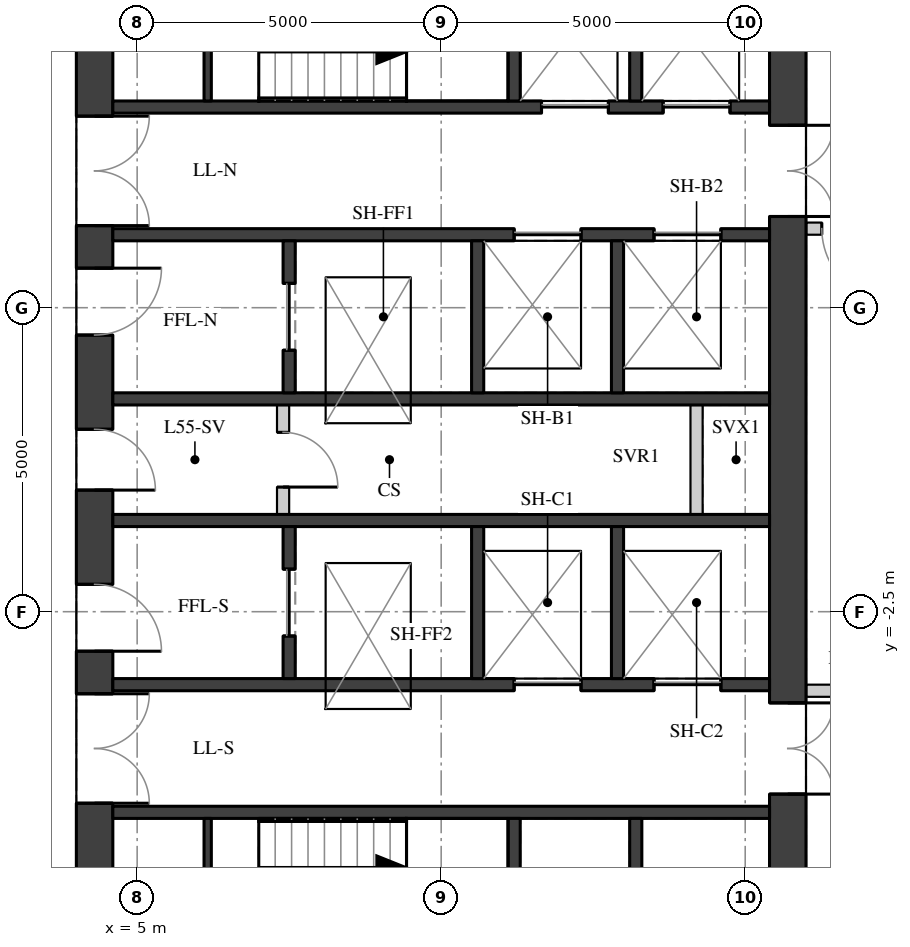
"""IFC4 building model, lengths in metres.
Left out: names, types, materials, properties, quantities, classifications, styles, units other than length and angle.
Written with IfcOpenShell. Run it as: python <this file> out.ifc"""

import sys

from ifc_helpers import new_model, si_unit, direction, frame, frame_2d, origin, place, context, subcontext, project, spatial, rectangle, extrude, element, fill, save


model = new_model("IFC4")
c1 = context("Model", 3, precision=1e-05, world=origin(), true_north=direction((0.0, 1.0)))
c2 = subcontext(c1, "Body", "Model", "MODEL_VIEW")
j1 = project(units=[si_unit("LENGTHUNIT", "METRE"), si_unit("PLANEANGLEUNIT", "RADIAN")], contexts=[c1])
p1 = place(None, origin())
s1 = spatial("IfcSite", under=j1, at=p1, CompositionType="ELEMENT")
p2 = place(p1, origin())
s2 = spatial("IfcBuilding", under=s1, at=p2, CompositionType="ELEMENT")
p3 = place(p2, frame((0.0, 0.0, 195.8)))
s3 = spatial("IfcBuildingStorey", under=s2, at=p3, CompositionType="ELEMENT", Elevation=195.8)
p4 = place(p3, frame((4.3, -9.4, 0.0), z_axis=(0.0, 0.0, 1.0), x_axis=(0.0, 1.0, 0.0)))
e1 = element("IfcWall", 1, at=p4, inside=s3, PredefinedType="SHEAR", context=c2, shape_type="SweptSolid", body=[
    extrude(rectangle(XDim=18.8, YDim=0.6, at=frame_2d((9.4, 0.0))), origin(), (0.0, 0.0, 1.0), 3.02),
])
p5 = place(p4, frame((0.65, 0.0, 0.0)))
e2 = element("IfcOpeningElement", 2, at=p5, cuts=e1, PredefinedType="OPENING", context=c2, shape_type="SweptSolid", body=[
    extrude(rectangle(XDim=1.5, YDim=2.1, at=frame_2d((0.75, 1.05))), frame((0.0, 0.31, 0.0), z_axis=(0.0, -1.0, 0.0), x_axis=(1.0, 0.0, 0.0)), (0.0, 0.0, 1.0), 0.62),
])
p6 = place(p4, frame((3.75, 0.0, 0.0)))
e3 = element("IfcOpeningElement", 3, at=p6, cuts=e1, PredefinedType="OPENING", context=c2, shape_type="SweptSolid", body=[
    extrude(rectangle(XDim=1.8, YDim=2.1, at=frame_2d((0.9, 1.05))), frame((0.0, 0.31, 0.0), z_axis=(0.0, -1.0, 0.0), x_axis=(1.0, 0.0, 0.0)), (0.0, 0.0, 1.0), 0.62),
])
p7 = place(p4, frame((6.25, 0.0, 0.0)))
e4 = element("IfcOpeningElement", 4, at=p7, cuts=e1, PredefinedType="OPENING", context=c2, shape_type="SweptSolid", body=[
    extrude(rectangle(XDim=1.1, YDim=2.1, at=frame_2d((0.55, 1.05))), frame((0.0, 0.31, 0.0), z_axis=(0.0, -1.0, 0.0), x_axis=(1.0, 0.0, 0.0)), (0.0, 0.0, 1.0), 0.62),
])
p8 = place(p4, frame((8.9, 0.0, 0.0)))
e5 = element("IfcOpeningElement", 5, at=p8, cuts=e1, PredefinedType="OPENING", context=c2, shape_type="SweptSolid", body=[
    extrude(rectangle(XDim=1.0, YDim=2.1, at=frame_2d((0.5, 1.05))), frame((0.0, 0.31, 0.0), z_axis=(0.0, -1.0, 0.0), x_axis=(1.0, 0.0, 0.0)), (0.0, 0.0, 1.0), 0.62),
])
p9 = place(p4, frame((11.45, 0.0, 0.0)))
e6 = element("IfcOpeningElement", 6, at=p9, cuts=e1, PredefinedType="OPENING", context=c2, shape_type="SweptSolid", body=[
    extrude(rectangle(XDim=1.1, YDim=2.1, at=frame_2d((0.55, 1.05))), frame((0.0, 0.31, 0.0), z_axis=(0.0, -1.0, 0.0), x_axis=(1.0, 0.0, 0.0)), (0.0, 0.0, 1.0), 0.62),
])
p10 = place(p4, frame((13.25, 0.0, 0.0)))
e7 = element("IfcOpeningElement", 7, at=p10, cuts=e1, PredefinedType="OPENING", context=c2, shape_type="SweptSolid", body=[
    extrude(rectangle(XDim=1.8, YDim=2.1, at=frame_2d((0.9, 1.05))), frame((0.0, 0.31, 0.0), z_axis=(0.0, -1.0, 0.0), x_axis=(1.0, 0.0, 0.0)), (0.0, 0.0, 1.0), 0.62),
])
p11 = place(p4, frame((16.65, 0.0, 0.0)))
e8 = element("IfcOpeningElement", 8, at=p11, cuts=e1, PredefinedType="OPENING", context=c2, shape_type="SweptSolid", body=[
    extrude(rectangle(XDim=1.5, YDim=2.1, at=frame_2d((0.75, 1.05))), frame((0.0, 0.31, 0.0), z_axis=(0.0, -1.0, 0.0), x_axis=(1.0, 0.0, 0.0)), (0.0, 0.0, 1.0), 0.62),
])
p12 = place(p3, frame((15.7, -9.4, 0.0), z_axis=(0.0, 0.0, 1.0), x_axis=(0.0, 1.0, 0.0)))
e9 = element("IfcWall", 9, at=p12, inside=s3, PredefinedType="SHEAR", context=c2, shape_type="SweptSolid", body=[
    extrude(rectangle(XDim=18.8, YDim=0.6, at=frame_2d((9.4, 0.0))), origin(), (0.0, 0.0, 1.0), 3.02),
])
p13 = place(p12, frame((13.4, 0.0, 0.0)))
e10 = element("IfcOpeningElement", 10, at=p13, cuts=e9, PredefinedType="OPENING", context=c2, shape_type="SweptSolid", body=[
    extrude(rectangle(XDim=1.5, YDim=2.1, at=frame_2d((0.75, 1.05))), frame((0.0, 0.31, 0.0), z_axis=(0.0, -1.0, 0.0), x_axis=(1.0, 0.0, 0.0)), (0.0, 0.0, 1.0), 0.62),
])
p14 = place(p12, frame((3.9, 0.0, 0.0)))
e11 = element("IfcOpeningElement", 11, at=p14, cuts=e9, PredefinedType="OPENING", context=c2, shape_type="SweptSolid", body=[
    extrude(rectangle(XDim=1.5, YDim=2.1, at=frame_2d((0.75, 1.05))), frame((0.0, 0.31, 0.0), z_axis=(0.0, -1.0, 0.0), x_axis=(1.0, 0.0, 0.0)), (0.0, 0.0, 1.0), 0.62),
])
p15 = place(p3, frame((4.6, 5.8, 0.0), z_axis=(0.0, 0.0, 1.0), x_axis=(1.0, 0.0, 0.0)))
e12 = element("IfcWall", 12, at=p15, inside=s3, PredefinedType="SHEAR", context=c2, shape_type="SweptSolid", body=[
    extrude(rectangle(XDim=10.8, YDim=0.2, at=frame_2d((5.4, 0.0))), origin(), (0.0, 0.0, 1.0), 3.02),
])
p16 = place(p15, frame((7.05, 0.0, 0.0)))
e13 = element("IfcOpeningElement", 13, at=p16, cuts=e12, PredefinedType="OPENING", context=c2, shape_type="SweptSolid", body=[
    extrude(rectangle(XDim=1.1, YDim=2.1, at=frame_2d((0.55, 1.05))), frame((0.0, 0.11, 0.0), z_axis=(0.0, -1.0, 0.0), x_axis=(1.0, 0.0, 0.0)), (0.0, 0.0, 1.0), 0.22),
])
p17 = place(p15, frame((9.05, 0.0, 0.0)))
e14 = element("IfcOpeningElement", 14, at=p17, cuts=e12, PredefinedType="OPENING", context=c2, shape_type="SweptSolid", body=[
    extrude(rectangle(XDim=1.1, YDim=2.1, at=frame_2d((0.55, 1.05))), frame((0.0, 0.11, 0.0), z_axis=(0.0, -1.0, 0.0), x_axis=(1.0, 0.0, 0.0)), (0.0, 0.0, 1.0), 0.22),
])
p18 = place(p3, frame((4.6, 3.7, 0.0), z_axis=(0.0, 0.0, 1.0), x_axis=(1.0, 0.0, 0.0)))
e15 = element("IfcWall", 15, at=p18, inside=s3, PredefinedType="SHEAR", context=c2, shape_type="SweptSolid", body=[
    extrude(rectangle(XDim=10.8, YDim=0.2, at=frame_2d((5.4, 0.0))), origin(), (0.0, 0.0, 1.0), 3.02),
])
p19 = place(p18, frame((6.6, 0.0, 0.0)))
e16 = element("IfcOpeningElement", 16, at=p19, cuts=e15, PredefinedType="OPENING", context=c2, shape_type="SweptSolid", body=[
    extrude(rectangle(XDim=1.1, YDim=2.1, at=frame_2d((0.55, 1.05))), frame((0.0, 0.11, 0.0), z_axis=(0.0, -1.0, 0.0), x_axis=(1.0, 0.0, 0.0)), (0.0, 0.0, 1.0), 0.22),
])
p20 = place(p18, frame((8.9, 0.0, 0.0)))
e17 = element("IfcOpeningElement", 17, at=p20, cuts=e15, PredefinedType="OPENING", context=c2, shape_type="SweptSolid", body=[
    extrude(rectangle(XDim=1.1, YDim=2.1, at=frame_2d((0.55, 1.05))), frame((0.0, 0.11, 0.0), z_axis=(0.0, -1.0, 0.0), x_axis=(1.0, 0.0, 0.0)), (0.0, 0.0, 1.0), 0.22),
])
for number, where, z_axis, x_axis in (
    (18, (4.6, 1.0, 0.0), (0.0, 0.0, 1.0), (1.0, 0.0, 0.0)),
    (19, (4.6, -1.0, 0.0), (0.0, 0.0, 1.0), (1.0, 0.0, 0.0)),
):
    element("IfcWall", number, at=place(p3, frame(where, z_axis=z_axis, x_axis=x_axis)), inside=s3, PredefinedType="SHEAR", context=c2, shape_type="SweptSolid", body=[
        extrude(rectangle(XDim=10.8, YDim=0.2, at=frame_2d((5.4, 0.0))), origin(), (0.0, 0.0, 1.0), 3.02),
    ])
p21 = place(p3, frame((4.6, -3.7, 0.0), z_axis=(0.0, 0.0, 1.0), x_axis=(1.0, 0.0, 0.0)))
e20 = element("IfcWall", 20, at=p21, inside=s3, PredefinedType="SHEAR", context=c2, shape_type="SweptSolid", body=[
    extrude(rectangle(XDim=10.8, YDim=0.2, at=frame_2d((5.4, 0.0))), origin(), (0.0, 0.0, 1.0), 3.02),
])
p22 = place(p21, frame((6.6, 0.0, 0.0)))
e21 = element("IfcOpeningElement", 21, at=p22, cuts=e20, PredefinedType="OPENING", context=c2, shape_type="SweptSolid", body=[
    extrude(rectangle(XDim=1.1, YDim=2.1, at=frame_2d((0.55, 1.05))), frame((0.0, 0.11, 0.0), z_axis=(0.0, -1.0, 0.0), x_axis=(1.0, 0.0, 0.0)), (0.0, 0.0, 1.0), 0.22),
])
p23 = place(p21, frame((8.9, 0.0, 0.0)))
e22 = element("IfcOpeningElement", 22, at=p23, cuts=e20, PredefinedType="OPENING", context=c2, shape_type="SweptSolid", body=[
    extrude(rectangle(XDim=1.1, YDim=2.1, at=frame_2d((0.55, 1.05))), frame((0.0, 0.11, 0.0), z_axis=(0.0, -1.0, 0.0), x_axis=(1.0, 0.0, 0.0)), (0.0, 0.0, 1.0), 0.22),
])
p24 = place(p3, frame((4.6, -5.8, 0.0), z_axis=(0.0, 0.0, 1.0), x_axis=(1.0, 0.0, 0.0)))
e23 = element("IfcWall", 23, at=p24, inside=s3, PredefinedType="SHEAR", context=c2, shape_type="SweptSolid", body=[
    extrude(rectangle(XDim=10.8, YDim=0.2, at=frame_2d((5.4, 0.0))), origin(), (0.0, 0.0, 1.0), 3.02),
])
for number, where, z_axis, x_axis in (
    (24, (11.2, 5.9, 0.0), (0.0, 0.0, 1.0), (0.0, 1.0, 0.0)),
    (25, (11.2, -9.4, 0.0), (0.0, 0.0, 1.0), (0.0, 1.0, 0.0)),
    (26, (13.2, 5.9, 0.0), (0.0, 0.0, 1.0), (0.0, 1.0, 0.0)),
    (27, (13.2, -9.4, 0.0), (0.0, 0.0, 1.0), (0.0, 1.0, 0.0)),
):
    element("IfcWall", number, at=place(p3, frame(where, z_axis=z_axis, x_axis=x_axis)), inside=s3, PredefinedType="SHEAR", context=c2, shape_type="SweptSolid", body=[
        extrude(rectangle(XDim=3.5, YDim=0.2, at=frame_2d((1.75, 0.0))), origin(), (0.0, 0.0, 1.0), 3.02),
    ])
p25 = place(p3, frame((7.5, 1.1, 0.0), z_axis=(0.0, 0.0, 1.0), x_axis=(0.0, 1.0, 0.0)))
e28 = element("IfcWall", 28, at=p25, inside=s3, PredefinedType="SHEAR", context=c2, shape_type="SweptSolid", body=[
    extrude(rectangle(XDim=2.5, YDim=0.2, at=frame_2d((1.25, 0.0))), origin(), (0.0, 0.0, 1.0), 3.02),
])
p26 = place(p25, frame((0.7, 0.0, 0.0)))
e29 = element("IfcOpeningElement", 29, at=p26, cuts=e28, PredefinedType="OPENING", context=c2, shape_type="SweptSolid", body=[
    extrude(rectangle(XDim=1.1, YDim=2.1, at=frame_2d((0.55, 1.05))), frame((0.0, 0.11, 0.0), z_axis=(0.0, -1.0, 0.0), x_axis=(1.0, 0.0, 0.0)), (0.0, 0.0, 1.0), 0.22),
])
p27 = place(p3, frame((7.5, -3.6, 0.0), z_axis=(0.0, 0.0, 1.0), x_axis=(0.0, 1.0, 0.0)))
e30 = element("IfcWall", 30, at=p27, inside=s3, PredefinedType="SHEAR", context=c2, shape_type="SweptSolid", body=[
    extrude(rectangle(XDim=2.5, YDim=0.2, at=frame_2d((1.25, 0.0))), origin(), (0.0, 0.0, 1.0), 3.02),
])
p28 = place(p27, frame((0.7, 0.0, 0.0)))
e31 = element("IfcOpeningElement", 31, at=p28, cuts=e30, PredefinedType="OPENING", context=c2, shape_type="SweptSolid", body=[
    extrude(rectangle(XDim=1.1, YDim=2.1, at=frame_2d((0.55, 1.05))), frame((0.0, 0.11, 0.0), z_axis=(0.0, -1.0, 0.0), x_axis=(1.0, 0.0, 0.0)), (0.0, 0.0, 1.0), 0.22),
])
for number, where, z_axis, x_axis in (
    (32, (10.6, 1.1, 0.0), (0.0, 0.0, 1.0), (0.0, 1.0, 0.0)),
    (33, (10.6, -3.6, 0.0), (0.0, 0.0, 1.0), (0.0, 1.0, 0.0)),
    (34, (12.9, 1.1, 0.0), (0.0, 0.0, 1.0), (0.0, 1.0, 0.0)),
    (35, (12.9, -3.6, 0.0), (0.0, 0.0, 1.0), (0.0, 1.0, 0.0)),
):
    element("IfcWall", number, at=place(p3, frame(where, z_axis=z_axis, x_axis=x_axis)), inside=s3, PredefinedType="SHEAR", context=c2, shape_type="SweptSolid", body=[
        extrude(rectangle(XDim=2.5, YDim=0.2, at=frame_2d((1.25, 0.0))), origin(), (0.0, 0.0, 1.0), 3.02),
    ])
p29 = place(p3, frame((6.16, 5.9, 0.0), z_axis=(0.0, 0.0, 1.0), x_axis=(0.0, 1.0, 0.0)))
e36 = element("IfcWall", 36, at=p29, inside=s3, PredefinedType="SHEAR", context=c2, shape_type="SweptSolid", body=[
    extrude(rectangle(XDim=3.5, YDim=0.12, at=frame_2d((1.75, 0.0))), origin(), (0.0, 0.0, 1.0), 3.02),
])
p30 = place(p29, frame((0.85, 0.0, 0.0)))
e37 = element("IfcOpeningElement", 37, at=p30, cuts=e36, PredefinedType="OPENING", context=c2, shape_type="SweptSolid", body=[
    extrude(rectangle(XDim=1.5, YDim=2.1, at=frame_2d((0.75, 1.05))), frame((0.0, 0.07, 0.0), z_axis=(0.0, -1.0, 0.0), x_axis=(1.0, 0.0, 0.0)), (0.0, 0.0, 1.0), 0.14),
])
p31 = place(p3, frame((6.16, -9.4, 0.0), z_axis=(0.0, 0.0, 1.0), x_axis=(0.0, 1.0, 0.0)))
e38 = element("IfcWall", 38, at=p31, inside=s3, PredefinedType="SHEAR", context=c2, shape_type="SweptSolid", body=[
    extrude(rectangle(XDim=3.5, YDim=0.12, at=frame_2d((1.75, 0.0))), origin(), (0.0, 0.0, 1.0), 3.02),
])
p32 = place(p31, frame((1.15, 0.0, 0.0)))
e39 = element("IfcOpeningElement", 39, at=p32, cuts=e38, PredefinedType="OPENING", context=c2, shape_type="SweptSolid", body=[
    extrude(rectangle(XDim=1.5, YDim=2.1, at=frame_2d((0.75, 1.05))), frame((0.0, 0.07, 0.0), z_axis=(0.0, -1.0, 0.0), x_axis=(1.0, 0.0, 0.0)), (0.0, 0.0, 1.0), 0.14),
])
p33 = place(p3, frame((7.4, -0.9, 0.0), z_axis=(0.0, 0.0, 1.0), x_axis=(0.0, 1.0, 0.0)))
e40 = element("IfcWall", 40, at=p33, inside=s3, PredefinedType="PARTITIONING", context=c2, shape_type="SweptSolid", body=[
    extrude(rectangle(XDim=1.8, YDim=0.2, at=frame_2d((0.9, 0.0))), origin(), (0.0, 0.0, 1.0), 3.02),
])
p34 = place(p33, frame((0.45, 0.0, 0.0)))
e41 = element("IfcOpeningElement", 41, at=p34, cuts=e40, PredefinedType="OPENING", context=c2, shape_type="SweptSolid", body=[
    extrude(rectangle(XDim=0.9, YDim=2.1, at=frame_2d((0.45, 1.05))), frame((0.0, 0.11, 0.0), z_axis=(0.0, -1.0, 0.0), x_axis=(1.0, 0.0, 0.0)), (0.0, 0.0, 1.0), 0.22),
])
p35 = place(p3, frame((14.2, -0.9, 0.0), z_axis=(0.0, 0.0, 1.0), x_axis=(0.0, 1.0, 0.0)))
e42 = element("IfcWall", 42, at=p35, inside=s3, PredefinedType="PARTITIONING", context=c2, shape_type="SweptSolid", body=[
    extrude(rectangle(XDim=1.8, YDim=0.2, at=frame_2d((0.9, 0.0))), origin(), (0.0, 0.0, 1.0), 3.02),
])
p36 = place(p3, frame((17.6, 3.8, 0.0), z_axis=(0.0, 0.0, 1.0), x_axis=(-1.0, 0.0, 0.0)))
e43 = element("IfcWall", 43, at=p36, inside=s3, PredefinedType="PARTITIONING", context=c2, shape_type="SweptSolid", body=[
    extrude(rectangle(XDim=1.596, YDim=0.2, at=frame_2d((0.798, 0.0))), origin(), (0.0, 0.0, 1.0), 3.02),
])
p37 = place(p36, frame((0.14, 0.0, 0.0)))
e44 = element("IfcOpeningElement", 44, at=p37, cuts=e43, PredefinedType="OPENING", context=c2, shape_type="SweptSolid", body=[
    extrude(rectangle(XDim=1.2, YDim=2.1, at=frame_2d((0.6, 1.05))), frame((0.0, 0.11, 0.0), z_axis=(0.0, -1.0, 0.0), x_axis=(1.0, 0.0, 0.0)), (0.0, 0.0, 1.0), 0.22),
])
p38 = place(p3, frame((16.004, -3.8, 0.0), z_axis=(0.0, 0.0, 1.0), x_axis=(1.0, 0.0, 0.0)))
e45 = element("IfcWall", 45, at=p38, inside=s3, PredefinedType="PARTITIONING", context=c2, shape_type="SweptSolid", body=[
    extrude(rectangle(XDim=1.596, YDim=0.2, at=frame_2d((0.798, 0.0))), origin(), (0.0, 0.0, 1.0), 2.47),
])
p39 = place(p6, origin())
e46 = element("IfcDoor", 46, at=p39, inside=s3, OperationType="DOUBLE_DOOR_SINGLE_SWING", PredefinedType="DOOR", context=c2, shape_type="SweptSolid", body=[
    extrude(rectangle(XDim=1.8, YDim=2.1, at=frame_2d((0.9, 1.05))), frame((0.0, 0.025, 0.0), z_axis=(0.0, -1.0, 0.0), x_axis=(1.0, 0.0, 0.0)), (0.0, 0.0, 1.0), 0.05),
])
fill(e3, e46)
p40 = place(p7, origin())
e47 = element("IfcDoor", 47, at=p40, inside=s3, OperationType="SINGLE_SWING_RIGHT", PredefinedType="DOOR", context=c2, shape_type="SweptSolid", body=[
    extrude(rectangle(XDim=1.1, YDim=2.1, at=frame_2d((0.55, 1.05))), frame((0.0, 0.025, 0.0), z_axis=(0.0, -1.0, 0.0), x_axis=(1.0, 0.0, 0.0)), (0.0, 0.0, 1.0), 0.05),
])
fill(e4, e47)
p41 = place(p8, origin())
e48 = element("IfcDoor", 48, at=p41, inside=s3, OperationType="SINGLE_SWING_RIGHT", PredefinedType="DOOR", context=c2, shape_type="SweptSolid", body=[
    extrude(rectangle(XDim=1.0, YDim=2.1, at=frame_2d((0.5, 1.05))), frame((0.0, 0.025, 0.0), z_axis=(0.0, -1.0, 0.0), x_axis=(1.0, 0.0, 0.0)), (0.0, 0.0, 1.0), 0.05),
])
fill(e5, e48)
p42 = place(p9, origin())
e49 = element("IfcDoor", 49, at=p42, inside=s3, OperationType="SINGLE_SWING_LEFT", PredefinedType="DOOR", context=c2, shape_type="SweptSolid", body=[
    extrude(rectangle(XDim=1.1, YDim=2.1, at=frame_2d((0.55, 1.05))), frame((0.0, 0.025, 0.0), z_axis=(0.0, -1.0, 0.0), x_axis=(1.0, 0.0, 0.0)), (0.0, 0.0, 1.0), 0.05),
])
fill(e6, e49)
p43 = place(p10, origin())
e50 = element("IfcDoor", 50, at=p43, inside=s3, OperationType="DOUBLE_DOOR_SINGLE_SWING", PredefinedType="DOOR", context=c2, shape_type="SweptSolid", body=[
    extrude(rectangle(XDim=1.8, YDim=2.1, at=frame_2d((0.9, 1.05))), frame((0.0, 0.025, 0.0), z_axis=(0.0, -1.0, 0.0), x_axis=(1.0, 0.0, 0.0)), (0.0, 0.0, 1.0), 0.05),
])
fill(e7, e50)
p44 = place(p13, origin())
e51 = element("IfcDoor", 51, at=p44, inside=s3, OperationType="DOUBLE_DOOR_SINGLE_SWING", PredefinedType="DOOR", context=c2, shape_type="SweptSolid", body=[
    extrude(rectangle(XDim=1.5, YDim=2.1, at=frame_2d((0.75, 1.05))), frame((0.0, 0.025, 0.0), z_axis=(0.0, -1.0, 0.0), x_axis=(1.0, 0.0, 0.0)), (0.0, 0.0, 1.0), 0.05),
])
fill(e10, e51)
p45 = place(p14, origin())
e52 = element("IfcDoor", 52, at=p45, inside=s3, OperationType="DOUBLE_DOOR_SINGLE_SWING", PredefinedType="DOOR", context=c2, shape_type="SweptSolid", body=[
    extrude(rectangle(XDim=1.5, YDim=2.1, at=frame_2d((0.75, 1.05))), frame((0.0, 0.025, 0.0), z_axis=(0.0, -1.0, 0.0), x_axis=(1.0, 0.0, 0.0)), (0.0, 0.0, 1.0), 0.05),
])
fill(e11, e52)
p46 = place(p16, origin())
e53 = element("IfcDoor", 53, at=p46, inside=s3, OperationType="DOUBLE_DOOR_SLIDING", PredefinedType="DOOR", context=c2, shape_type="SweptSolid", body=[
    extrude(rectangle(XDim=1.1, YDim=2.1, at=frame_2d((0.55, 1.05))), frame((0.0, 0.025, 0.0), z_axis=(0.0, -1.0, 0.0), x_axis=(1.0, 0.0, 0.0)), (0.0, 0.0, 1.0), 0.05),
])
fill(e13, e53)
p47 = place(p17, origin())
e54 = element("IfcDoor", 54, at=p47, inside=s3, OperationType="DOUBLE_DOOR_SLIDING", PredefinedType="DOOR", context=c2, shape_type="SweptSolid", body=[
    extrude(rectangle(XDim=1.1, YDim=2.1, at=frame_2d((0.55, 1.05))), frame((0.0, 0.025, 0.0), z_axis=(0.0, -1.0, 0.0), x_axis=(1.0, 0.0, 0.0)), (0.0, 0.0, 1.0), 0.05),
])
fill(e14, e54)
p48 = place(p19, origin())
e55 = element("IfcDoor", 55, at=p48, inside=s3, OperationType="DOUBLE_DOOR_SLIDING", PredefinedType="DOOR", context=c2, shape_type="SweptSolid", body=[
    extrude(rectangle(XDim=1.1, YDim=2.1, at=frame_2d((0.55, 1.05))), frame((0.0, 0.025, 0.0), z_axis=(0.0, -1.0, 0.0), x_axis=(1.0, 0.0, 0.0)), (0.0, 0.0, 1.0), 0.05),
])
fill(e16, e55)
p49 = place(p20, origin())
e56 = element("IfcDoor", 56, at=p49, inside=s3, OperationType="DOUBLE_DOOR_SLIDING", PredefinedType="DOOR", context=c2, shape_type="SweptSolid", body=[
    extrude(rectangle(XDim=1.1, YDim=2.1, at=frame_2d((0.55, 1.05))), frame((0.0, 0.025, 0.0), z_axis=(0.0, -1.0, 0.0), x_axis=(1.0, 0.0, 0.0)), (0.0, 0.0, 1.0), 0.05),
])
fill(e17, e56)
p50 = place(p22, origin())
e57 = element("IfcDoor", 57, at=p50, inside=s3, OperationType="DOUBLE_DOOR_SLIDING", PredefinedType="DOOR", context=c2, shape_type="SweptSolid", body=[
    extrude(rectangle(XDim=1.1, YDim=2.1, at=frame_2d((0.55, 1.05))), frame((0.0, 0.025, 0.0), z_axis=(0.0, -1.0, 0.0), x_axis=(1.0, 0.0, 0.0)), (0.0, 0.0, 1.0), 0.05),
])
fill(e21, e57)
p51 = place(p23, origin())
e58 = element("IfcDoor", 58, at=p51, inside=s3, OperationType="DOUBLE_DOOR_SLIDING", PredefinedType="DOOR", context=c2, shape_type="SweptSolid", body=[
    extrude(rectangle(XDim=1.1, YDim=2.1, at=frame_2d((0.55, 1.05))), frame((0.0, 0.025, 0.0), z_axis=(0.0, -1.0, 0.0), x_axis=(1.0, 0.0, 0.0)), (0.0, 0.0, 1.0), 0.05),
])
fill(e22, e58)
p52 = place(p26, origin())
e59 = element("IfcDoor", 59, at=p52, inside=s3, OperationType="DOUBLE_DOOR_SLIDING", PredefinedType="DOOR", context=c2, shape_type="SweptSolid", body=[
    extrude(rectangle(XDim=1.1, YDim=2.1, at=frame_2d((0.55, 1.05))), frame((0.0, 0.025, 0.0), z_axis=(0.0, -1.0, 0.0), x_axis=(1.0, 0.0, 0.0)), (0.0, 0.0, 1.0), 0.05),
])
fill(e29, e59)
p53 = place(p28, origin())
e60 = element("IfcDoor", 60, at=p53, inside=s3, OperationType="DOUBLE_DOOR_SLIDING", PredefinedType="DOOR", context=c2, shape_type="SweptSolid", body=[
    extrude(rectangle(XDim=1.1, YDim=2.1, at=frame_2d((0.55, 1.05))), frame((0.0, 0.025, 0.0), z_axis=(0.0, -1.0, 0.0), x_axis=(1.0, 0.0, 0.0)), (0.0, 0.0, 1.0), 0.05),
])
fill(e31, e60)
p54 = place(p34, origin())
e61 = element("IfcDoor", 61, at=p54, inside=s3, OperationType="SINGLE_SWING_RIGHT", PredefinedType="DOOR", context=c2, shape_type="SweptSolid", body=[
    extrude(rectangle(XDim=0.9, YDim=2.1, at=frame_2d((0.45, 1.05))), frame((0.0, 0.025, 0.0), z_axis=(0.0, -1.0, 0.0), x_axis=(1.0, 0.0, 0.0)), (0.0, 0.0, 1.0), 0.05),
])
fill(e41, e61)
p55 = place(p37, origin())
e62 = element("IfcDoor", 62, at=p55, inside=s3, OperationType="SINGLE_SWING_LEFT", PredefinedType="DOOR", context=c2, shape_type="SweptSolid", body=[
    extrude(rectangle(XDim=1.2, YDim=2.1, at=frame_2d((0.6, 1.05))), frame((0.0, 0.025, 0.0), z_axis=(0.0, -1.0, 0.0), x_axis=(1.0, 0.0, 0.0)), (0.0, 0.0, 1.0), 0.05),
])
fill(e44, e62)
save(model, sys.argv[1])
